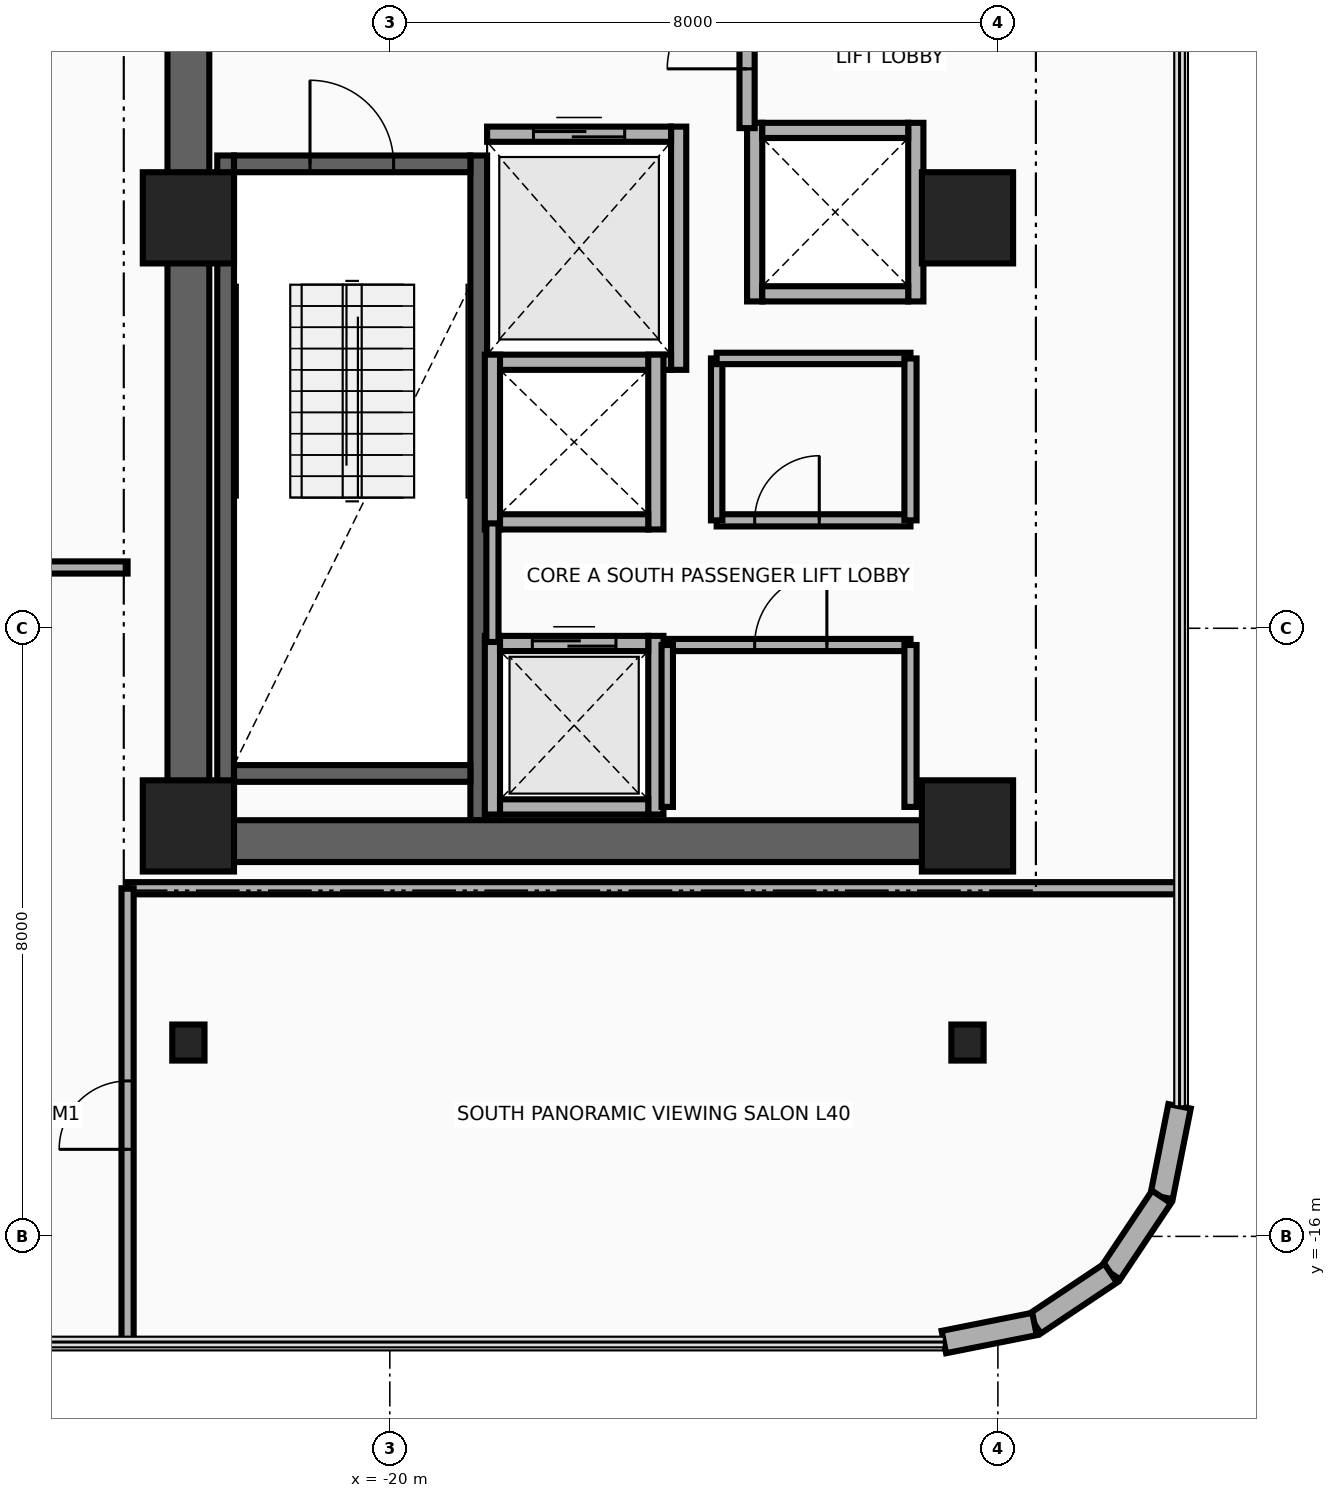
"""IFC4 building model, lengths in metres.
Left out: names, types, materials, properties, quantities, classifications, styles, units other than length and angle.
Written with IfcOpenShell. Run it as: python <this file> out.ifc"""

import sys

from ifc_helpers import new_model, si_unit, direction, frame, frame_2d, origin, origin_2d, place, context, subcontext, project, spatial, rectangle, i_section, extrude, source, transform, mapped, element, fill, save


model = new_model("IFC4")
c1 = context("Model", 3, precision=1e-05, world=origin(), true_north=direction((0.0, 1.0)))
c2 = subcontext(c1, "Body", "Model", "MODEL_VIEW")
j1 = project(units=[si_unit("LENGTHUNIT", "METRE"), si_unit("PLANEANGLEUNIT", "RADIAN")], contexts=[c1])
p1 = place(None, origin())
s1 = spatial("IfcSite", under=j1, at=p1, CompositionType="ELEMENT")
p2 = place(p1, origin())
s2 = spatial("IfcBuilding", under=s1, at=p2, CompositionType="ELEMENT")
p3 = place(p2, frame((0.0, 0.0, 157.5)))
s3 = spatial("IfcBuildingStorey", under=s2, at=p3, CompositionType="ELEMENT", Elevation=157.5)
for number, where, z_axis, x_axis in (
    (1, (-22.16, -10.525, 0.0), (0.0, 0.0, 1.0), (0.0, 1.0, 0.0)),
    (2, (-18.83, -10.525, 0.0), (0.0, 0.0, 1.0), (0.0, 1.0, 0.0)),
):
    element("IfcWall", number, at=place(p3, frame(where, z_axis=z_axis, x_axis=x_axis)), inside=s3, PredefinedType="SHEAR", context=c2, shape_type="SweptSolid", body=[
        extrude(rectangle(XDim=8.745, YDim=0.22, at=frame_2d((4.373, 0.0))), origin(), (0.0, 0.0, 1.0), 3.46),
    ])
p4 = place(p3, frame((-22.05, -9.91, 0.0), z_axis=(0.0, 0.0, 1.0), x_axis=(1.0, 0.0, 0.0)))
e3 = element("IfcWall", 3, at=p4, inside=s3, PredefinedType="SHEAR", context=c2, shape_type="SweptSolid", body=[
    extrude(rectangle(XDim=3.11, YDim=0.22, at=frame_2d((1.555, 0.0))), origin(), (0.0, 0.0, 1.0), 3.46),
])
p5 = place(p3, frame((-22.05, -1.89, 0.0), z_axis=(0.0, 0.0, 1.0), x_axis=(1.0, 0.0, 0.0)))
e4 = element("IfcWall", 4, at=p5, inside=s3, PredefinedType="SHEAR", context=c2, shape_type="SweptSolid", body=[
    extrude(rectangle(XDim=3.11, YDim=0.22, at=frame_2d((1.555, 0.0))), origin(), (0.0, 0.0, 1.0), 3.46),
])
p6 = place(p5, frame((1.0, 0.0, 0.0)))
e5 = element("IfcOpeningElement", 5, at=p6, cuts=e4, PredefinedType="OPENING", context=c2, shape_type="SweptSolid", body=[
    extrude(rectangle(XDim=1.1, YDim=2.15, at=frame_2d((0.55, 1.075))), frame((0.0, 0.125, 0.0), z_axis=(0.0, -1.0, 0.0), x_axis=(1.0, 0.0, 0.0)), (0.0, 0.0, 1.0), 0.25),
])
p7 = place(p3, frame((-22.65, -11.075, 0.0), z_axis=(0.0, 0.0, 1.0), x_axis=(0.0, 1.0, 0.0)))
e6 = element("IfcWall", 6, at=p7, inside=s3, PredefinedType="SHEAR", context=c2, shape_type="SweptSolid", body=[
    extrude(rectangle(XDim=22.15, YDim=0.55, at=frame_2d((11.075, 0.0))), origin(), (0.0, 0.0, 1.0), 3.46),
])
p8 = place(p3, frame((-22.65, -10.8, 0.0), z_axis=(0.0, 0.0, 1.0), x_axis=(1.0, 0.0, 0.0)))
e7 = element("IfcWall", 7, at=p8, inside=s3, PredefinedType="SHEAR", context=c2, shape_type="SweptSolid", body=[
    extrude(rectangle(XDim=10.25, YDim=0.55, at=frame_2d((5.125, 0.0))), origin(), (0.0, 0.0, 1.0), 3.46),
])
m1 = source(origin(), c2, "Body", "SweptSolid", [
    extrude(rectangle(XDim=1.2, YDim=1.2, at=origin_2d()), origin(), (0.0, 0.0, 1.0), 3.7),
])
for number, where, z_axis, x_axis in (
    (8, (-22.65, -10.6, 0.0), (0.0, 0.0, 1.0), (1.0, 0.0, 0.0)),
    (9, (-12.4, -10.6, 0.0), (0.0, 0.0, 1.0), (1.0, 0.0, 0.0)),
    (10, (-22.65, -2.6, 0.0), (0.0, 0.0, 1.0), (1.0, 0.0, 0.0)),
    (11, (-12.4, -2.6, 0.0), (0.0, 0.0, 1.0), (1.0, 0.0, 0.0)),
):
    element("IfcColumn", number, at=place(p3, frame(where, z_axis=z_axis, x_axis=x_axis)), inside=s3, PredefinedType="COLUMN", context=c2, shape_type="MappedRepresentation", body=[
        mapped(m1, transform((0.0, 0.0, 0.0), x_axis=(1.0, 0.0, 0.0), y_axis=(0.0, 1.0, 0.0), z_axis=(0.0, 0.0, 1.0), scale=1.0)),
    ])
m2 = source(origin(), c2, "Body", "SweptSolid", [
    extrude(i_section(OverallWidth=0.424, OverallDepth=0.474, WebThickness=0.048, FlangeThickness=0.077, at=origin_2d()), origin(), (0.0, 0.0, 1.0), 3.7),
])
for number, where, z_axis, x_axis in (
    (12, (-22.65, -13.45, 0.0), (0.0, 0.0, 1.0), (1.0, 0.0, 0.0)),
    (13, (-12.4, -13.45, 0.0), (0.0, 0.0, 1.0), (1.0, 0.0, 0.0)),
):
    element("IfcColumn", number, at=place(p3, frame(where, z_axis=z_axis, x_axis=x_axis)), inside=s3, PredefinedType="COLUMN", context=c2, shape_type="MappedRepresentation", body=[
        mapped(m2, transform((0.0, 0.0, 0.0), x_axis=(1.0, 0.0, 0.0), y_axis=(0.0, 1.0, 0.0), z_axis=(0.0, 0.0, 1.0), scale=1.0)),
    ])
p9 = place(p3, frame((-9.61, -14.289, 0.0), z_axis=(0.0, 0.0, 1.0), x_axis=(-0.194996050505, -0.980804027463, 0.0)))
e14 = element("IfcWall", 14, at=p9, inside=s3, PredefinedType="SOLIDWALL", context=c2, shape_type="SweptSolid", body=[
    extrude(rectangle(XDim=1.216, YDim=0.3, at=frame_2d((0.608, 0.0))), origin(), (0.0, 0.0, 1.0), 3.46),
])
for number, where, z_axis, x_axis in (
    (15, (-9.847, -15.482, 0.0), (0.0, 0.0, 1.0), (-0.556, -0.831, 0.0)),
    (16, (-10.517, -16.483, 0.0), (0.0, 0.0, 1.0), (-0.831, -0.556, 0.0)),
):
    element("IfcWall", number, at=place(p3, frame(where, z_axis=z_axis, x_axis=x_axis)), inside=s3, PredefinedType="SOLIDWALL", context=c2, shape_type="SweptSolid", body=[
        extrude(rectangle(XDim=1.205, YDim=0.3, at=frame_2d((0.603, 0.0))), origin(), (0.0, 0.0, 1.0), 3.46),
    ])
p10 = place(p3, frame((-11.518, -17.153, 0.0), z_axis=(0.0, 0.0, 1.0), x_axis=(-0.980804027463, -0.194996050505, 0.0)))
e17 = element("IfcWall", 17, at=p10, inside=s3, PredefinedType="SOLIDWALL", context=c2, shape_type="SweptSolid", body=[
    extrude(rectangle(XDim=1.216, YDim=0.3, at=frame_2d((0.608, 0.0))), origin(), (0.0, 0.0, 1.0), 3.46),
])
p11 = place(p3, frame((-16.2, -4.6, 0.0), z_axis=(0.0, 0.0, 1.0), x_axis=(0.0, 1.0, 0.0)))
e18 = element("IfcWall", 18, at=p11, inside=s3, PredefinedType="MOVABLE", context=c2, shape_type="SweptSolid", body=[
    extrude(rectangle(XDim=3.2, YDim=0.2, at=frame_2d((1.6, 0.0))), origin(), (0.0, 0.0, 1.0), 3.46),
])
p12 = place(p3, frame((-18.72, -4.5, 0.0), z_axis=(0.0, 0.0, 1.0), x_axis=(1.0, 0.0, 0.0)))
e19 = element("IfcWall", 19, at=p12, inside=s3, PredefinedType="MOVABLE", context=c2, shape_type="SweptSolid", body=[
    extrude(rectangle(XDim=2.42, YDim=0.2, at=frame_2d((1.21, 0.0))), origin(), (0.0, 0.0, 1.0), 3.46),
])
p13 = place(p3, frame((-18.72, -1.5, 0.0), z_axis=(0.0, 0.0, 1.0), x_axis=(1.0, 0.0, 0.0)))
e20 = element("IfcWall", 20, at=p13, inside=s3, PredefinedType="MOVABLE", context=c2, shape_type="SweptSolid", body=[
    extrude(rectangle(XDim=2.42, YDim=0.2, at=frame_2d((1.21, 0.0))), origin(), (0.0, 0.0, 1.0), 3.46),
])
p14 = place(p13, frame((0.61, 0.0, 0.0)))
e21 = element("IfcOpeningElement", 21, at=p14, cuts=e20, PredefinedType="OPENING", context=c2, shape_type="SweptSolid", body=[
    extrude(rectangle(XDim=1.2, YDim=2.1, at=frame_2d((0.6, 1.05))), frame((0.0, 0.115, 0.0), z_axis=(0.0, -1.0, 0.0), x_axis=(1.0, 0.0, 0.0)), (0.0, 0.0, 1.0), 0.23),
])
for number, where, z_axis, x_axis in (
    (22, (-18.65, -10.45, 0.0), (0.0, 0.0, 1.0), (0.0, 1.0, 0.0)),
    (23, (-16.5, -10.45, 0.0), (0.0, 0.0, 1.0), (0.0, 1.0, 0.0)),
):
    element("IfcWall", number, at=place(p3, frame(where, z_axis=z_axis, x_axis=x_axis)), inside=s3, PredefinedType="MOVABLE", context=c2, shape_type="SweptSolid", body=[
        extrude(rectangle(XDim=2.35, YDim=0.2, at=frame_2d((1.175, 0.0))), origin(), (0.0, 0.0, 1.0), 2.666),
    ])
p15 = place(p3, frame((-18.55, -10.35, 0.0), z_axis=(0.0, 0.0, 1.0), x_axis=(1.0, 0.0, 0.0)))
e24 = element("IfcWall", 24, at=p15, inside=s3, PredefinedType="MOVABLE", context=c2, shape_type="SweptSolid", body=[
    extrude(rectangle(XDim=1.95, YDim=0.2, at=frame_2d((0.975, 0.0))), origin(), (0.0, 0.0, 1.0), 2.666),
])
p16 = place(p3, frame((-18.55, -8.2, 0.0), z_axis=(0.0, 0.0, 1.0), x_axis=(1.0, 0.0, 0.0)))
e25 = element("IfcWall", 25, at=p16, inside=s3, PredefinedType="MOVABLE", context=c2, shape_type="SweptSolid", body=[
    extrude(rectangle(XDim=1.95, YDim=0.2, at=frame_2d((0.975, 0.0))), origin(), (0.0, 0.0, 1.0), 3.46),
])
p17 = place(p16, frame((0.425, 0.0, 0.0)))
e26 = element("IfcOpeningElement", 26, at=p17, cuts=e25, PredefinedType="OPENING", context=c2, shape_type="SweptSolid", body=[
    extrude(rectangle(XDim=1.1, YDim=2.1, at=frame_2d((0.55, 1.05))), frame((0.0, 0.115, 0.0), z_axis=(0.0, -1.0, 0.0), x_axis=(1.0, 0.0, 0.0)), (0.0, 0.0, 1.0), 0.23),
])
for number, where, z_axis, x_axis in (
    (27, (-18.65, -6.7, 0.0), (0.0, 0.0, 1.0), (0.0, 1.0, 0.0)),
    (28, (-16.5, -6.7, 0.0), (0.0, 0.0, 1.0), (0.0, 1.0, 0.0)),
):
    element("IfcWall", number, at=place(p3, frame(where, z_axis=z_axis, x_axis=x_axis)), inside=s3, PredefinedType="MOVABLE", context=c2, shape_type="SweptSolid", body=[
        extrude(rectangle(XDim=2.3, YDim=0.2, at=frame_2d((1.15, 0.0))), origin(), (0.0, 0.0, 1.0), 3.46),
    ])
p18 = place(p3, frame((-18.55, -6.6, 0.0), z_axis=(0.0, 0.0, 1.0), x_axis=(1.0, 0.0, 0.0)))
e29 = element("IfcWall", 29, at=p18, inside=s3, PredefinedType="MOVABLE", context=c2, shape_type="SweptSolid", body=[
    extrude(rectangle(XDim=1.95, YDim=0.2, at=frame_2d((0.975, 0.0))), origin(), (0.0, 0.0, 1.0), 3.46),
])
for number, where, z_axis, x_axis in (
    (30, (-15.2, -3.7, 0.0), (0.0, 0.0, 1.0), (0.0, 1.0, 0.0)),
    (31, (-13.08, -3.7, 0.0), (0.0, 0.0, 1.0), (0.0, 1.0, 0.0)),
):
    element("IfcWall", number, at=place(p3, frame(where, z_axis=z_axis, x_axis=x_axis)), inside=s3, PredefinedType="MOVABLE", context=c2, shape_type="SweptSolid", body=[
        extrude(rectangle(XDim=2.35, YDim=0.2, at=frame_2d((1.175, 0.0))), origin(), (0.0, 0.0, 1.0), 3.46),
    ])
for number, where, z_axis, x_axis in (
    (32, (-15.1, -3.6, 0.0), (0.0, 0.0, 1.0), (1.0, 0.0, 0.0)),
    (33, (-15.1, -1.45, 0.0), (0.0, 0.0, 1.0), (1.0, 0.0, 0.0)),
):
    element("IfcWall", number, at=place(p3, frame(where, z_axis=z_axis, x_axis=x_axis)), inside=s3, PredefinedType="MOVABLE", context=c2, shape_type="SweptSolid", body=[
        extrude(rectangle(XDim=1.92, YDim=0.2, at=frame_2d((0.96, 0.0))), origin(), (0.0, 0.0, 1.0), 3.46),
    ])
p19 = place(p3, frame((-15.3, -1.42, 0.0), z_axis=(0.0, 0.0, 1.0), x_axis=(0.0, 1.0, 0.0)))
e34 = element("IfcWall", 34, at=p19, inside=s3, PredefinedType="PARTITIONING", context=c2, shape_type="SweptSolid", body=[
    extrude(rectangle(XDim=2.67, YDim=0.2, at=frame_2d((1.335, 0.0))), origin(), (0.0, 0.0, 1.0), 3.46),
])
p20 = place(p19, frame((0.78, 0.0, 0.0)))
e35 = element("IfcOpeningElement", 35, at=p20, cuts=e34, PredefinedType="OPENING", context=c2, shape_type="SweptSolid", body=[
    extrude(rectangle(XDim=1.05, YDim=2.15, at=frame_2d((0.525, 1.075))), frame((0.0, 0.115, 0.0), z_axis=(0.0, -1.0, 0.0), x_axis=(1.0, 0.0, 0.0)), (0.0, 0.0, 1.0), 0.23),
])
p21 = place(p3, frame((-18.65, -8.18, 0.0), z_axis=(0.0, 0.0, 1.0), x_axis=(0.0, 1.0, 0.0)))
e36 = element("IfcWall", 36, at=p21, inside=s3, PredefinedType="PARTITIONING", context=c2, shape_type="SweptSolid", body=[
    extrude(rectangle(XDim=1.56, YDim=0.16, at=frame_2d((0.78, 0.0))), origin(), (0.0, 0.0, 1.0), 3.46),
])
p22 = place(p3, frame((-16.35, -8.22, 0.0), z_axis=(0.0, 0.0, 1.0), x_axis=(1.0, 0.0, 0.0)))
e37 = element("IfcWall", 37, at=p22, inside=s3, PredefinedType="PARTITIONING", context=c2, shape_type="SweptSolid", body=[
    extrude(rectangle(XDim=3.2, YDim=0.16, at=frame_2d((1.6, 0.0))), origin(), (0.0, 0.0, 1.0), 3.46),
])
p23 = place(p22, frame((1.15, 0.0, 0.0)))
e38 = element("IfcOpeningElement", 38, at=p23, cuts=e37, PredefinedType="OPENING", context=c2, shape_type="SweptSolid", body=[
    extrude(rectangle(XDim=0.95, YDim=2.15, at=frame_2d((0.475, 1.075))), frame((0.0, 0.095, 0.0), z_axis=(0.0, -1.0, 0.0), x_axis=(1.0, 0.0, 0.0)), (0.0, 0.0, 1.0), 0.19),
])
p24 = place(p3, frame((-16.35, -10.35, 0.0), z_axis=(0.0, 0.0, 1.0), x_axis=(0.0, 1.0, 0.0)))
e39 = element("IfcWall", 39, at=p24, inside=s3, PredefinedType="PARTITIONING", context=c2, shape_type="SweptSolid", body=[
    extrude(rectangle(XDim=2.13, YDim=0.15, at=frame_2d((1.065, 0.0))), origin(), (0.0, 0.0, 1.0), 3.46),
])
p25 = place(p3, frame((-13.15, -10.35, 0.0), z_axis=(0.0, 0.0, 1.0), x_axis=(0.0, 1.0, 0.0)))
e40 = element("IfcWall", 40, at=p25, inside=s3, PredefinedType="PARTITIONING", context=c2, shape_type="SweptSolid", body=[
    extrude(rectangle(XDim=2.13, YDim=0.16, at=frame_2d((1.065, 0.0))), origin(), (0.0, 0.0, 1.0), 3.46),
])
p26 = place(p3, frame((-15.7, -6.58, 0.0), z_axis=(0.0, 0.0, 1.0), x_axis=(1.0, 0.0, 0.0)))
e41 = element("IfcWall", 41, at=p26, inside=s3, PredefinedType="PARTITIONING", context=c2, shape_type="SweptSolid", body=[
    extrude(rectangle(XDim=2.55, YDim=0.16, at=frame_2d((1.275, 0.0))), origin(), (0.0, 0.0, 1.0), 3.46),
])
p27 = place(p26, frame((0.5, 0.0, 0.0)))
e42 = element("IfcOpeningElement", 42, at=p27, cuts=e41, PredefinedType="OPENING", context=c2, shape_type="SweptSolid", body=[
    extrude(rectangle(XDim=0.85, YDim=2.05, at=frame_2d((0.425, 1.025))), frame((0.0, 0.095, 0.0), z_axis=(0.0, -1.0, 0.0), x_axis=(1.0, 0.0, 0.0)), (0.0, 0.0, 1.0), 0.19),
])
p28 = place(p3, frame((-15.7, -6.58, 0.0), z_axis=(0.0, 0.0, 1.0), x_axis=(0.0, 1.0, 0.0)))
e43 = element("IfcWall", 43, at=p28, inside=s3, PredefinedType="PARTITIONING", context=c2, shape_type="SweptSolid", body=[
    extrude(rectangle(XDim=2.13, YDim=0.15, at=frame_2d((1.065, 0.0))), origin(), (0.0, 0.0, 1.0), 3.46),
])
p29 = place(p3, frame((-15.7, -4.45, 0.0), z_axis=(0.0, 0.0, 1.0), x_axis=(1.0, 0.0, 0.0)))
e44 = element("IfcWall", 44, at=p29, inside=s3, PredefinedType="PARTITIONING", context=c2, shape_type="SweptSolid", body=[
    extrude(rectangle(XDim=2.55, YDim=0.15, at=frame_2d((1.275, 0.0))), origin(), (0.0, 0.0, 1.0), 3.46),
])
p30 = place(p3, frame((-13.15, -6.58, 0.0), z_axis=(0.0, 0.0, 1.0), x_axis=(0.0, 1.0, 0.0)))
e45 = element("IfcWall", 45, at=p30, inside=s3, PredefinedType="PARTITIONING", context=c2, shape_type="SweptSolid", body=[
    extrude(rectangle(XDim=2.13, YDim=0.16, at=frame_2d((1.065, 0.0))), origin(), (0.0, 0.0, 1.0), 3.46),
])
p31 = place(p3, frame((-23.45, -11.42, 0.0), z_axis=(0.0, 0.0, 1.0), x_axis=(1.0, 0.0, 0.0)))
e46 = element("IfcWall", 46, at=p31, inside=s3, PredefinedType="PARTITIONING", context=c2, shape_type="SweptSolid", body=[
    extrude(rectangle(XDim=13.84, YDim=0.16, at=frame_2d((6.92, 0.0))), origin(), (0.0, 0.0, 1.0), 2.834),
])
p32 = place(p3, frame((-23.45, -17.39, 0.0), z_axis=(0.0, 0.0, 1.0), x_axis=(0.0, 1.0, 0.0)))
e47 = element("IfcWall", 47, at=p32, inside=s3, PredefinedType="PARTITIONING", context=c2, shape_type="SweptSolid", body=[
    extrude(rectangle(XDim=5.97, YDim=0.16, at=frame_2d((2.985, 0.0))), origin(), (0.0, 0.0, 1.0), 3.46),
])
p33 = place(p32, frame((2.535, 0.0, 0.0)))
e48 = element("IfcOpeningElement", 48, at=p33, cuts=e47, PredefinedType="OPENING", context=c2, shape_type="SweptSolid", body=[
    extrude(rectangle(XDim=0.9, YDim=2.1, at=frame_2d((0.45, 1.05))), frame((0.0, 0.095, 0.0), z_axis=(0.0, -1.0, 0.0), x_axis=(1.0, 0.0, 0.0)), (0.0, 0.0, 1.0), 0.19),
])
p34 = place(p3, frame((-30.89, -7.2, 0.0), z_axis=(0.0, 0.0, 1.0), x_axis=(1.0, 0.0, 0.0)))
e49 = element("IfcWall", 49, at=p34, inside=s3, PredefinedType="PARTITIONING", context=c2, shape_type="SweptSolid", body=[
    extrude(rectangle(XDim=7.44, YDim=0.16, at=frame_2d((3.72, 0.0))), origin(), (0.0, 0.0, 1.0), 2.896),
])
p35 = place(p34, frame((3.245, 0.0, 0.0)))
e50 = element("IfcOpeningElement", 50, at=p35, cuts=e49, PredefinedType="OPENING", context=c2, shape_type="SweptSolid", body=[
    extrude(rectangle(XDim=0.95, YDim=2.15, at=frame_2d((0.475, 1.075))), frame((0.0, 0.095, 0.0), z_axis=(0.0, -1.0, 0.0), x_axis=(1.0, 0.0, 0.0)), (0.0, 0.0, 1.0), 0.19),
])
p36 = place(p14, origin())
e51 = element("IfcDoor", 51, at=p36, inside=s3, OperationType="DOUBLE_DOOR_SLIDING", PredefinedType="DOOR", context=c2, shape_type="SweptSolid", body=[
    extrude(rectangle(XDim=1.2, YDim=2.1, at=frame_2d((0.6, 1.05))), frame((0.0, 0.025, 0.0), z_axis=(0.0, -1.0, 0.0), x_axis=(1.0, 0.0, 0.0)), (0.0, 0.0, 1.0), 0.05),
])
fill(e21, e51)
p37 = place(p17, origin())
e52 = element("IfcDoor", 52, at=p37, inside=s3, OperationType="DOUBLE_DOOR_SLIDING", PredefinedType="DOOR", context=c2, shape_type="SweptSolid", body=[
    extrude(rectangle(XDim=1.1, YDim=2.1, at=frame_2d((0.55, 1.05))), frame((0.0, 0.025, 0.0), z_axis=(0.0, -1.0, 0.0), x_axis=(1.0, 0.0, 0.0)), (0.0, 0.0, 1.0), 0.05),
])
fill(e26, e52)
p38 = place(p20, origin())
e53 = element("IfcDoor", 53, at=p38, inside=s3, OperationType="SINGLE_SWING_RIGHT", PredefinedType="DOOR", context=c2, shape_type="SweptSolid", body=[
    extrude(rectangle(XDim=1.05, YDim=2.15, at=frame_2d((0.525, 1.075))), frame((0.0, 0.025, 0.0), z_axis=(0.0, -1.0, 0.0), x_axis=(1.0, 0.0, 0.0)), (0.0, 0.0, 1.0), 0.05),
])
fill(e35, e53)
p39 = place(p6, origin())
e54 = element("IfcDoor", 54, at=p39, inside=s3, OperationType="SINGLE_SWING_RIGHT", PredefinedType="DOOR", context=c2, shape_type="SweptSolid", body=[
    extrude(rectangle(XDim=1.1, YDim=2.15, at=frame_2d((0.55, 1.075))), frame((0.0, 0.025, 0.0), z_axis=(0.0, -1.0, 0.0), x_axis=(1.0, 0.0, 0.0)), (0.0, 0.0, 1.0), 0.05),
])
fill(e5, e54)
p40 = place(p23, origin())
e55 = element("IfcDoor", 55, at=p40, inside=s3, OperationType="SINGLE_SWING_LEFT", PredefinedType="DOOR", context=c2, shape_type="SweptSolid", body=[
    extrude(rectangle(XDim=0.95, YDim=2.15, at=frame_2d((0.475, 1.075))), frame((0.0, 0.025, 0.0), z_axis=(0.0, -1.0, 0.0), x_axis=(1.0, 0.0, 0.0)), (0.0, 0.0, 1.0), 0.05),
])
fill(e38, e55)
p41 = place(p27, origin())
e56 = element("IfcDoor", 56, at=p41, inside=s3, OperationType="SINGLE_SWING_RIGHT", PredefinedType="DOOR", context=c2, shape_type="SweptSolid", body=[
    extrude(rectangle(XDim=0.85, YDim=2.05, at=frame_2d((0.425, 1.025))), frame((0.0, 0.025, 0.0), z_axis=(0.0, -1.0, 0.0), x_axis=(1.0, 0.0, 0.0)), (0.0, 0.0, 1.0), 0.05),
])
fill(e42, e56)
p42 = place(p33, origin())
e57 = element("IfcDoor", 57, at=p42, inside=s3, OperationType="SINGLE_SWING_RIGHT", PredefinedType="DOOR", context=c2, shape_type="SweptSolid", body=[
    extrude(rectangle(XDim=0.9, YDim=2.1, at=frame_2d((0.45, 1.05))), frame((0.0, 0.025, 0.0), z_axis=(0.0, -1.0, 0.0), x_axis=(1.0, 0.0, 0.0)), (0.0, 0.0, 1.0), 0.05),
])
fill(e48, e57)
save(model, sys.argv[1])
